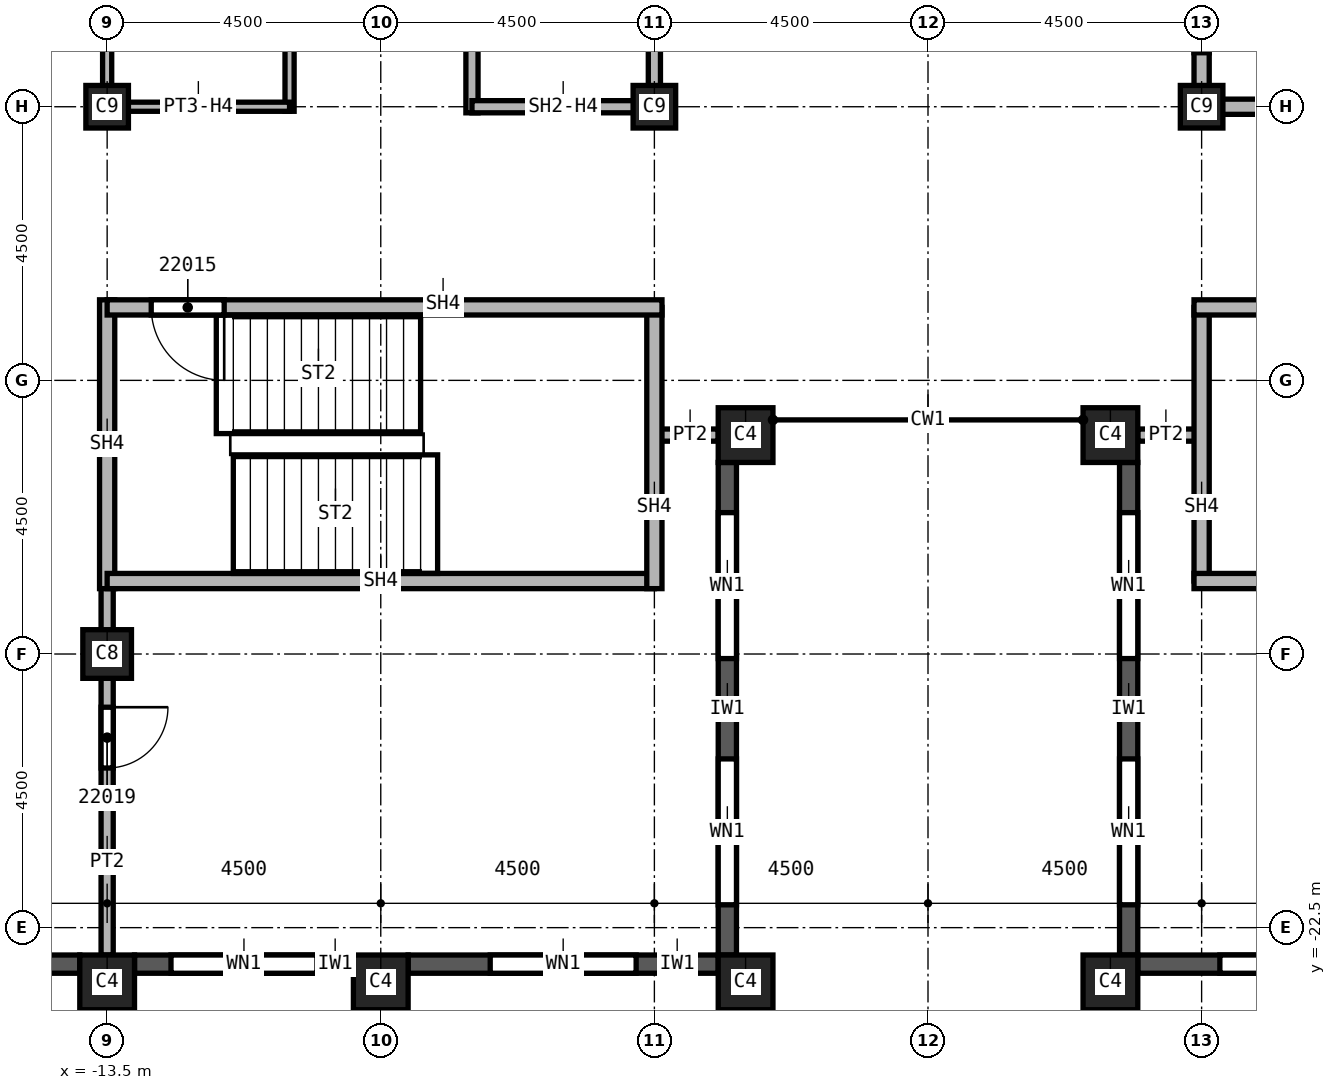
"""IFC4 building model, lengths in metres.
Left out: names, types, materials, properties, quantities, classifications, styles, units other than length and angle.
Written with IfcOpenShell. Run it as: python <this file> out.ifc"""

import sys

from ifc_helpers import new_model, si_unit, direction, frame, frame_2d, origin, origin_2d, place, context, subcontext, project, spatial, rectangle, extrude, element, fill, save


model = new_model("IFC4")
c1 = context("Model", 3, precision=1e-05, world=origin(), true_north=direction((0.0, 1.0)))
c2 = subcontext(c1, "Body", "Model", "MODEL_VIEW")
j1 = project(units=[si_unit("LENGTHUNIT", "METRE"), si_unit("PLANEANGLEUNIT", "RADIAN")], contexts=[c1])
p1 = place(None, origin())
s1 = spatial("IfcSite", under=j1, at=p1, CompositionType="ELEMENT")
p2 = place(p1, origin())
s2 = spatial("IfcBuilding", under=s1, at=p2, CompositionType="ELEMENT")
p3 = place(p2, frame((0.0, 0.0, 312.0)))
s3 = spatial("IfcBuildingStorey", under=s2, at=p3, CompositionType="ELEMENT", Elevation=312.0)
p4 = place(p3, frame((-13.5, -18.0, 0.0), z_axis=(0.0, 0.0, 1.0), x_axis=(1.0, 0.0, 0.0)))
e1 = element("IfcColumn", 1, at=p4, inside=s3, PredefinedType="COLUMN", context=c2, shape_type="SweptSolid", body=[
    extrude(rectangle(XDim=0.8, YDim=0.8, at=origin_2d()), origin(), (0.0, 0.0, 1.0), 3.74),
])
for number, where, z_axis, x_axis in (
    (2, (4.5, -9.0, 0.0), (0.0, 0.0, 1.0), (1.0, 0.0, 0.0)),
    (3, (-4.5, -9.0, 0.0), (0.0, 0.0, 1.0), (1.0, 0.0, 0.0)),
    (4, (-13.5, -9.0, 0.0), (0.0, 0.0, 1.0), (1.0, 0.0, 0.0)),
):
    element("IfcColumn", number, at=place(p3, frame(where, z_axis=z_axis, x_axis=x_axis)), inside=s3, PredefinedType="COLUMN", context=c2, shape_type="SweptSolid", body=[
        extrude(rectangle(XDim=0.7, YDim=0.7, at=origin_2d()), origin(), (0.0, 0.0, 1.0), 3.74),
    ])
for number, where, z_axis, x_axis in (
    (5, (3.0, -23.4, 0.0), (0.0, 0.0, 1.0), (1.0, 0.0, 0.0)),
    (6, (-3.0, -23.4, 0.0), (0.0, 0.0, 1.0), (1.0, 0.0, 0.0)),
    (7, (-9.0, -23.4, 0.0), (0.0, 0.0, 1.0), (1.0, 0.0, 0.0)),
    (8, (-13.5, -23.4, 0.0), (0.0, 0.0, 1.0), (1.0, 0.0, 0.0)),
    (9, (3.0, -14.4, 0.0), (0.0, 0.0, 1.0), (1.0, 0.0, 0.0)),
    (10, (-3.0, -14.4, 0.0), (0.0, 0.0, 1.0), (1.0, 0.0, 0.0)),
):
    element("IfcColumn", number, at=place(p3, frame(where, z_axis=z_axis, x_axis=x_axis)), inside=s3, PredefinedType="COLUMN", context=c2, shape_type="SweptSolid", body=[
        extrude(rectangle(XDim=0.9, YDim=0.9, at=origin_2d()), origin(), (0.0, 0.0, 1.0), 3.74),
    ])
p5 = place(p3, frame((-17.55, -23.1, 0.0), z_axis=(0.0, 0.0, 1.0), x_axis=(1.0, 0.0, 0.0)))
e11 = element("IfcWall", 11, at=p5, inside=s3, PredefinedType="SOLIDWALL", context=c2, shape_type="SweptSolid", body=[
    extrude(rectangle(XDim=3.6, YDim=0.3, at=frame_2d((1.8, 0.0))), origin(), (0.0, 0.0, 1.0), 3.14),
])
p6 = place(p5, frame((0.775, 0.0, 0.8)))
e12 = element("IfcOpeningElement", 12, at=p6, cuts=e11, PredefinedType="OPENING", context=c2, shape_type="SweptSolid", body=[
    extrude(rectangle(XDim=1.0, YDim=1.95, at=frame_2d((0.5, 0.975))), frame((0.0, 0.15, 0.0), z_axis=(0.0, -1.0, 0.0), x_axis=(1.0, 0.0, 0.0)), (0.0, 0.0, 1.0), 0.3),
])
p7 = place(p5, frame((2.375, 0.0, 0.8)))
e13 = element("IfcOpeningElement", 13, at=p7, cuts=e11, PredefinedType="OPENING", context=c2, shape_type="SweptSolid", body=[
    extrude(rectangle(XDim=0.6, YDim=1.95, at=frame_2d((0.3, 0.975))), frame((0.0, 0.15, 0.0), z_axis=(0.0, -1.0, 0.0), x_axis=(1.0, 0.0, 0.0)), (0.0, 0.0, 1.0), 0.3),
])
p8 = place(p3, frame((-13.05, -23.1, 0.0), z_axis=(0.0, 0.0, 1.0), x_axis=(1.0, 0.0, 0.0)))
e14 = element("IfcWall", 14, at=p8, inside=s3, PredefinedType="SOLIDWALL", context=c2, shape_type="SweptSolid", body=[
    extrude(rectangle(XDim=3.6, YDim=0.3, at=frame_2d((1.8, 0.0))), origin(), (0.0, 0.0, 1.0), 3.14),
])
p9 = place(p8, frame((0.6, 0.0, 0.8)))
e15 = element("IfcOpeningElement", 15, at=p9, cuts=e14, PredefinedType="OPENING", context=c2, shape_type="SweptSolid", body=[
    extrude(rectangle(XDim=2.4, YDim=1.95, at=frame_2d((1.2, 0.975))), frame((0.0, 0.15, 0.0), z_axis=(0.0, -1.0, 0.0), x_axis=(1.0, 0.0, 0.0)), (0.0, 0.0, 1.0), 0.3),
])
p10 = place(p3, frame((-8.55, -23.1, 0.0), z_axis=(0.0, 0.0, 1.0), x_axis=(1.0, 0.0, 0.0)))
e16 = element("IfcWall", 16, at=p10, inside=s3, PredefinedType="SOLIDWALL", context=c2, shape_type="SweptSolid", body=[
    extrude(rectangle(XDim=5.1, YDim=0.3, at=frame_2d((2.55, 0.0))), origin(), (0.0, 0.0, 1.0), 3.14),
])
p11 = place(p10, frame((1.35, 0.0, 0.8)))
e17 = element("IfcOpeningElement", 17, at=p11, cuts=e16, PredefinedType="OPENING", context=c2, shape_type="SweptSolid", body=[
    extrude(rectangle(XDim=2.4, YDim=1.95, at=frame_2d((1.2, 0.975))), frame((0.0, 0.15, 0.0), z_axis=(0.0, -1.0, 0.0), x_axis=(1.0, 0.0, 0.0)), (0.0, 0.0, 1.0), 0.3),
])
p12 = place(p3, frame((-3.3, -22.95, 0.0), z_axis=(0.0, 0.0, 1.0), x_axis=(0.0, 1.0, 0.0)))
e18 = element("IfcWall", 18, at=p12, inside=s3, PredefinedType="SOLIDWALL", context=c2, shape_type="SweptSolid", body=[
    extrude(rectangle(XDim=8.1, YDim=0.3, at=frame_2d((4.05, 0.0))), origin(), (0.0, 0.0, 1.0), 3.14),
])
p13 = place(p12, frame((0.825, 0.0, 0.8)))
e19 = element("IfcOpeningElement", 19, at=p13, cuts=e18, PredefinedType="OPENING", context=c2, shape_type="SweptSolid", body=[
    extrude(rectangle(XDim=2.4, YDim=1.95, at=frame_2d((1.2, 0.975))), frame((0.0, 0.15, 0.0), z_axis=(0.0, -1.0, 0.0), x_axis=(1.0, 0.0, 0.0)), (0.0, 0.0, 1.0), 0.3),
])
p14 = place(p12, frame((4.875, 0.0, 0.8)))
e20 = element("IfcOpeningElement", 20, at=p14, cuts=e18, PredefinedType="OPENING", context=c2, shape_type="SweptSolid", body=[
    extrude(rectangle(XDim=2.4, YDim=1.95, at=frame_2d((1.2, 0.975))), frame((0.0, 0.15, 0.0), z_axis=(0.0, -1.0, 0.0), x_axis=(1.0, 0.0, 0.0)), (0.0, 0.0, 1.0), 0.3),
])
p15 = place(p3, frame((3.3, -14.85, 0.0), z_axis=(0.0, 0.0, 1.0), x_axis=(0.0, -1.0, 0.0)))
e21 = element("IfcWall", 21, at=p15, inside=s3, PredefinedType="SOLIDWALL", context=c2, shape_type="SweptSolid", body=[
    extrude(rectangle(XDim=8.1, YDim=0.3, at=frame_2d((4.05, 0.0))), origin(), (0.0, 0.0, 1.0), 3.14),
])
p16 = place(p15, frame((0.825, 0.0, 0.8)))
e22 = element("IfcOpeningElement", 22, at=p16, cuts=e21, PredefinedType="OPENING", context=c2, shape_type="SweptSolid", body=[
    extrude(rectangle(XDim=2.4, YDim=1.95, at=frame_2d((1.2, 0.975))), frame((0.0, 0.15, 0.0), z_axis=(0.0, -1.0, 0.0), x_axis=(1.0, 0.0, 0.0)), (0.0, 0.0, 1.0), 0.3),
])
p17 = place(p15, frame((4.875, 0.0, 0.8)))
e23 = element("IfcOpeningElement", 23, at=p17, cuts=e21, PredefinedType="OPENING", context=c2, shape_type="SweptSolid", body=[
    extrude(rectangle(XDim=2.4, YDim=1.95, at=frame_2d((1.2, 0.975))), frame((0.0, 0.15, 0.0), z_axis=(0.0, -1.0, 0.0), x_axis=(1.0, 0.0, 0.0)), (0.0, 0.0, 1.0), 0.3),
])
p18 = place(p3, frame((3.45, -23.1, 0.0), z_axis=(0.0, 0.0, 1.0), x_axis=(1.0, 0.0, 0.0)))
e24 = element("IfcWall", 24, at=p18, inside=s3, PredefinedType="SOLIDWALL", context=c2, shape_type="SweptSolid", body=[
    extrude(rectangle(XDim=5.1, YDim=0.3, at=frame_2d((2.55, 0.0))), origin(), (0.0, 0.0, 1.0), 3.14),
])
p19 = place(p18, frame((1.35, 0.0, 0.8)))
e25 = element("IfcOpeningElement", 25, at=p19, cuts=e24, PredefinedType="OPENING", context=c2, shape_type="SweptSolid", body=[
    extrude(rectangle(XDim=2.4, YDim=1.95, at=frame_2d((1.2, 0.975))), frame((0.0, 0.15, 0.0), z_axis=(0.0, -1.0, 0.0), x_axis=(1.0, 0.0, 0.0)), (0.0, 0.0, 1.0), 0.3),
])
p20 = place(p3, frame((-13.5, -16.675, 0.0), z_axis=(0.0, 0.0, 1.0), x_axis=(0.0, -1.0, 0.0)))
e26 = element("IfcWall", 26, at=p20, inside=s3, PredefinedType="PARTITIONING", context=c2, shape_type="SweptSolid", body=[
    extrude(rectangle(XDim=6.275, YDim=0.2, at=frame_2d((3.137, 0.0))), origin(), (0.0, 0.0, 1.0), 3.74),
])
p21 = place(p20, frame((2.2, 0.0, 0.0)))
e27 = element("IfcOpeningElement", 27, at=p21, cuts=e26, PredefinedType="OPENING", context=c2, shape_type="SweptSolid", body=[
    extrude(rectangle(XDim=1.0, YDim=2.1, at=frame_2d((0.5, 1.05))), frame((0.0, 0.1, 0.0), z_axis=(0.0, -1.0, 0.0), x_axis=(1.0, 0.0, 0.0)), (0.0, 0.0, 1.0), 0.2),
])
for number, where, z_axis, x_axis in (
    (28, (-3.45, -14.4, 0.0), (0.0, 0.0, 1.0), (-1.0, 0.0, 0.0)),
    (29, (4.5, -14.4, 0.0), (0.0, 0.0, 1.0), (-1.0, 0.0, 0.0)),
):
    element("IfcWall", number, at=place(p3, frame(where, z_axis=z_axis, x_axis=x_axis)), inside=s3, PredefinedType="PARTITIONING", context=c2, shape_type="SweptSolid", body=[
        extrude(rectangle(XDim=1.05, YDim=0.2, at=frame_2d((0.525, 0.0))), origin(), (0.0, 0.0, 1.0), 3.74),
    ])
p22 = place(p3, frame((-7.5, -9.1, 0.0), z_axis=(0.0, 0.0, 1.0), x_axis=(0.0, 1.0, 0.0)))
e30 = element("IfcWall", 30, at=p22, inside=s3, PredefinedType="SOLIDWALL", context=c2, shape_type="SweptSolid", body=[
    extrude(rectangle(XDim=6.225, YDim=0.2, at=frame_2d((3.113, 0.0))), origin(), (0.0, 0.0, 1.0), 3.74),
])
p23 = place(p3, frame((-4.5, -9.0, 0.0), z_axis=(0.0, 0.0, 1.0), x_axis=(-1.0, 0.0, 0.0)))
e31 = element("IfcWall", 31, at=p23, inside=s3, PredefinedType="SOLIDWALL", context=c2, shape_type="SweptSolid", body=[
    extrude(rectangle(XDim=3.0, YDim=0.2, at=frame_2d((1.5, 0.0))), origin(), (0.0, 0.0, 1.0), 3.062),
])
p24 = place(p3, frame((-4.5, 6.0, 0.0), z_axis=(0.0, 0.0, 1.0), x_axis=(0.0, -1.0, 0.0)))
e32 = element("IfcWall", 32, at=p24, inside=s3, PredefinedType="SOLIDWALL", context=c2, shape_type="SweptSolid", body=[
    extrude(rectangle(XDim=15.1, YDim=0.2, at=frame_2d((7.55, 0.0))), origin(), (0.0, 0.0, 1.0), 3.062),
])
p25 = place(p24, frame((7.3, 0.0, 0.0)))
e33 = element("IfcOpeningElement", 33, at=p25, cuts=e32, PredefinedType="OPENING", context=c2, shape_type="SweptSolid", body=[
    extrude(rectangle(XDim=1.1, YDim=2.1, at=frame_2d((0.55, 1.05))), frame((0.0, 0.1, 0.0), z_axis=(0.0, -1.0, 0.0), x_axis=(1.0, 0.0, 0.0)), (0.0, 0.0, 1.0), 0.2),
])
p26 = place(p24, frame((4.0, 0.0, 0.0)))
e34 = element("IfcOpeningElement", 34, at=p26, cuts=e32, PredefinedType="OPENING", context=c2, shape_type="SweptSolid", body=[
    extrude(rectangle(XDim=1.1, YDim=2.1, at=frame_2d((0.55, 1.05))), frame((0.0, 0.1, 0.0), z_axis=(0.0, -1.0, 0.0), x_axis=(1.0, 0.0, 0.0)), (0.0, 0.0, 1.0), 0.2),
])
p27 = place(p3, frame((4.5, -9.125, 0.0), z_axis=(0.0, 0.0, 1.0), x_axis=(0.0, 1.0, 0.0)))
e35 = element("IfcWall", 35, at=p27, inside=s3, PredefinedType="SOLIDWALL", context=c2, shape_type="SweptSolid", body=[
    extrude(rectangle(XDim=3.125, YDim=0.25, at=frame_2d((1.562, 0.0))), origin(), (0.0, 0.0, 1.0), 3.062),
])
p28 = place(p27, frame((1.012, 0.0, 0.0)))
e36 = element("IfcOpeningElement", 36, at=p28, cuts=e35, PredefinedType="OPENING", context=c2, shape_type="SweptSolid", body=[
    extrude(rectangle(XDim=1.1, YDim=2.1, at=frame_2d((0.55, 1.05))), frame((0.0, 0.125, 0.0), z_axis=(0.0, -1.0, 0.0), x_axis=(1.0, 0.0, 0.0)), (0.0, 0.0, 1.0), 0.25),
])
p29 = place(p3, frame((7.5, -9.0, 0.0), z_axis=(0.0, 0.0, 1.0), x_axis=(-1.0, 0.0, 0.0)))
e37 = element("IfcWall", 37, at=p29, inside=s3, PredefinedType="SOLIDWALL", context=c2, shape_type="SweptSolid", body=[
    extrude(rectangle(XDim=3.0, YDim=0.25, at=frame_2d((1.5, 0.0))), origin(), (0.0, 0.0, 1.0), 3.062),
])
p30 = place(p3, frame((-13.5, -12.175, 0.0), z_axis=(0.0, 0.0, 1.0), x_axis=(0.0, -1.0, 0.0)))
e38 = element("IfcWall", 38, at=p30, inside=s3, PredefinedType="SOLIDWALL", context=c2, shape_type="SweptSolid", body=[
    extrude(rectangle(XDim=4.75, YDim=0.25, at=frame_2d((2.375, 0.0))), origin(), (0.0, 0.0, 1.0), 3.74),
])
p31 = place(p3, frame((-4.5, -16.8, 0.0), z_axis=(0.0, 0.0, 1.0), x_axis=(-1.0, 0.0, 0.0)))
e39 = element("IfcWall", 39, at=p31, inside=s3, PredefinedType="SOLIDWALL", context=c2, shape_type="SweptSolid", body=[
    extrude(rectangle(XDim=9.0, YDim=0.25, at=frame_2d((4.5, 0.0))), origin(), (0.0, 0.0, 1.0), 3.74),
])
p32 = place(p3, frame((-4.5, -12.3, 0.0), z_axis=(0.0, 0.0, 1.0), x_axis=(0.0, -1.0, 0.0)))
e40 = element("IfcWall", 40, at=p32, inside=s3, PredefinedType="SOLIDWALL", context=c2, shape_type="SweptSolid", body=[
    extrude(rectangle(XDim=4.625, YDim=0.25, at=frame_2d((2.312, 0.0))), origin(), (0.0, 0.0, 1.0), 3.74),
])
p33 = place(p3, frame((-4.375, -12.3, 0.0), z_axis=(0.0, 0.0, 1.0), x_axis=(-1.0, 0.0, 0.0)))
e41 = element("IfcWall", 41, at=p33, inside=s3, PredefinedType="SOLIDWALL", context=c2, shape_type="SweptSolid", body=[
    extrude(rectangle(XDim=9.125, YDim=0.25, at=frame_2d((4.562, 0.0))), origin(), (0.0, 0.0, 1.0), 3.74),
])
p34 = place(p33, frame((7.2, 0.0, 0.0)))
e42 = element("IfcOpeningElement", 42, at=p34, cuts=e41, PredefinedType="OPENING", context=c2, shape_type="SweptSolid", body=[
    extrude(rectangle(XDim=1.2, YDim=2.1, at=frame_2d((0.6, 1.05))), frame((0.0, 0.125, 0.0), z_axis=(0.0, -1.0, 0.0), x_axis=(1.0, 0.0, 0.0)), (0.0, 0.0, 1.0), 0.25),
])
p35 = place(p3, frame((4.5, -16.8, 0.0), z_axis=(0.0, 0.0, 1.0), x_axis=(0.0, 1.0, 0.0)))
e43 = element("IfcWall", 43, at=p35, inside=s3, PredefinedType="SOLIDWALL", context=c2, shape_type="SweptSolid", body=[
    extrude(rectangle(XDim=4.5, YDim=0.25, at=frame_2d((2.25, 0.0))), origin(), (0.0, 0.0, 1.0), 3.74),
])
p36 = place(p3, frame((13.5, -16.8, 0.0), z_axis=(0.0, 0.0, 1.0), x_axis=(-1.0, 0.0, 0.0)))
e44 = element("IfcWall", 44, at=p36, inside=s3, PredefinedType="SOLIDWALL", context=c2, shape_type="SweptSolid", body=[
    extrude(rectangle(XDim=9.125, YDim=0.25, at=frame_2d((4.562, 0.0))), origin(), (0.0, 0.0, 1.0), 3.74),
])
p37 = place(p3, frame((13.5, -12.3, 0.0), z_axis=(0.0, 0.0, 1.0), x_axis=(-1.0, 0.0, 0.0)))
e45 = element("IfcWall", 45, at=p37, inside=s3, PredefinedType="SOLIDWALL", context=c2, shape_type="SweptSolid", body=[
    extrude(rectangle(XDim=9.125, YDim=0.25, at=frame_2d((4.562, 0.0))), origin(), (0.0, 0.0, 1.0), 3.74),
])
p38 = place(p37, frame((0.6, 0.0, 0.0)))
e46 = element("IfcOpeningElement", 46, at=p38, cuts=e45, PredefinedType="OPENING", context=c2, shape_type="SweptSolid", body=[
    extrude(rectangle(XDim=1.2, YDim=2.1, at=frame_2d((0.6, 1.05))), frame((0.0, 0.125, 0.0), z_axis=(0.0, -1.0, 0.0), x_axis=(1.0, 0.0, 0.0)), (0.0, 0.0, 1.0), 0.25),
])
p39 = place(p3, frame((-13.5, -9.075, 0.0), z_axis=(0.0, 0.0, 1.0), x_axis=(0.0, 1.0, 0.0)))
e47 = element("IfcWall", 47, at=p39, inside=s3, PredefinedType="PARTITIONING", context=c2, shape_type="SweptSolid", body=[
    extrude(rectangle(XDim=4.075, YDim=0.15, at=frame_2d((2.038, 0.0))), origin(), (0.0, 0.0, 1.0), 3.062),
])
p40 = place(p3, frame((-10.5, -9.075, 0.0), z_axis=(0.0, 0.0, 1.0), x_axis=(0.0, 1.0, 0.0)))
e48 = element("IfcWall", 48, at=p40, inside=s3, PredefinedType="PARTITIONING", context=c2, shape_type="SweptSolid", body=[
    extrude(rectangle(XDim=4.15, YDim=0.15, at=frame_2d((2.075, 0.0))), origin(), (0.0, 0.0, 1.0), 3.74),
])
p41 = place(p40, frame((2.95, 0.0, 0.0)))
e49 = element("IfcOpeningElement", 49, at=p41, cuts=e48, PredefinedType="OPENING", context=c2, shape_type="SweptSolid", body=[
    extrude(rectangle(XDim=0.9, YDim=2.1, at=frame_2d((0.45, 1.05))), frame((0.0, 0.075, 0.0), z_axis=(0.0, -1.0, 0.0), x_axis=(1.0, 0.0, 0.0)), (0.0, 0.0, 1.0), 0.15),
])
p42 = place(p3, frame((-10.5, -9.0, 0.0), z_axis=(0.0, 0.0, 1.0), x_axis=(-1.0, 0.0, 0.0)))
e50 = element("IfcWall", 50, at=p42, inside=s3, PredefinedType="PARTITIONING", context=c2, shape_type="SweptSolid", body=[
    extrude(rectangle(XDim=3.0, YDim=0.15, at=frame_2d((1.5, 0.0))), origin(), (0.0, 0.0, 1.0), 3.062),
])
p43 = place(p9, origin())
e51 = element("IfcWindow", 51, at=p43, inside=s3, PartitioningType="SINGLE_PANEL", PredefinedType="WINDOW", context=c2, shape_type="SweptSolid", body=[
    extrude(rectangle(XDim=2.4, YDim=1.95, at=frame_2d((1.2, 0.975))), frame((0.0, 0.03, 0.0), z_axis=(0.0, -1.0, 0.0), x_axis=(1.0, 0.0, 0.0)), (0.0, 0.0, 1.0), 0.06),
])
fill(e15, e51)
p44 = place(p11, origin())
e52 = element("IfcWindow", 52, at=p44, inside=s3, PartitioningType="SINGLE_PANEL", PredefinedType="WINDOW", context=c2, shape_type="SweptSolid", body=[
    extrude(rectangle(XDim=2.4, YDim=1.95, at=frame_2d((1.2, 0.975))), frame((0.0, 0.03, 0.0), z_axis=(0.0, -1.0, 0.0), x_axis=(1.0, 0.0, 0.0)), (0.0, 0.0, 1.0), 0.06),
])
fill(e17, e52)
p45 = place(p13, origin())
e53 = element("IfcWindow", 53, at=p45, inside=s3, PartitioningType="SINGLE_PANEL", PredefinedType="WINDOW", context=c2, shape_type="SweptSolid", body=[
    extrude(rectangle(XDim=2.4, YDim=1.95, at=frame_2d((1.2, 0.975))), frame((0.0, 0.03, 0.0), z_axis=(0.0, -1.0, 0.0), x_axis=(1.0, 0.0, 0.0)), (0.0, 0.0, 1.0), 0.06),
])
fill(e19, e53)
p46 = place(p14, origin())
e54 = element("IfcWindow", 54, at=p46, inside=s3, PartitioningType="SINGLE_PANEL", PredefinedType="WINDOW", context=c2, shape_type="SweptSolid", body=[
    extrude(rectangle(XDim=2.4, YDim=1.95, at=frame_2d((1.2, 0.975))), frame((0.0, 0.03, 0.0), z_axis=(0.0, -1.0, 0.0), x_axis=(1.0, 0.0, 0.0)), (0.0, 0.0, 1.0), 0.06),
])
fill(e20, e54)
p47 = place(p16, origin())
e55 = element("IfcWindow", 55, at=p47, inside=s3, PartitioningType="SINGLE_PANEL", PredefinedType="WINDOW", context=c2, shape_type="SweptSolid", body=[
    extrude(rectangle(XDim=2.4, YDim=1.95, at=frame_2d((1.2, 0.975))), frame((0.0, 0.03, 0.0), z_axis=(0.0, -1.0, 0.0), x_axis=(1.0, 0.0, 0.0)), (0.0, 0.0, 1.0), 0.06),
])
fill(e22, e55)
p48 = place(p17, origin())
e56 = element("IfcWindow", 56, at=p48, inside=s3, PartitioningType="SINGLE_PANEL", PredefinedType="WINDOW", context=c2, shape_type="SweptSolid", body=[
    extrude(rectangle(XDim=2.4, YDim=1.95, at=frame_2d((1.2, 0.975))), frame((0.0, 0.03, 0.0), z_axis=(0.0, -1.0, 0.0), x_axis=(1.0, 0.0, 0.0)), (0.0, 0.0, 1.0), 0.06),
])
fill(e23, e56)
p49 = place(p19, origin())
e57 = element("IfcWindow", 57, at=p49, inside=s3, PartitioningType="SINGLE_PANEL", PredefinedType="WINDOW", context=c2, shape_type="SweptSolid", body=[
    extrude(rectangle(XDim=2.4, YDim=1.95, at=frame_2d((1.2, 0.975))), frame((0.0, 0.03, 0.0), z_axis=(0.0, -1.0, 0.0), x_axis=(1.0, 0.0, 0.0)), (0.0, 0.0, 1.0), 0.06),
])
fill(e25, e57)
p50 = place(p34, origin())
e58 = element("IfcDoor", 58, at=p50, inside=s3, OperationType="SINGLE_SWING_RIGHT", PredefinedType="DOOR", context=c2, shape_type="SweptSolid", body=[
    extrude(rectangle(XDim=1.2, YDim=2.1, at=frame_2d((0.6, 1.05))), frame((0.0, 0.025, 0.0), z_axis=(0.0, -1.0, 0.0), x_axis=(1.0, 0.0, 0.0)), (0.0, 0.0, 1.0), 0.05),
])
fill(e42, e58)
p51 = place(p21, origin())
e59 = element("IfcDoor", 59, at=p51, inside=s3, OperationType="SINGLE_SWING_RIGHT", PredefinedType="DOOR", context=c2, shape_type="SweptSolid", body=[
    extrude(rectangle(XDim=1.0, YDim=2.1, at=frame_2d((0.5, 1.05))), frame((0.0, 0.025, 0.0), z_axis=(0.0, -1.0, 0.0), x_axis=(1.0, 0.0, 0.0)), (0.0, 0.0, 1.0), 0.05),
])
fill(e27, e59)
p52 = place(p28, origin())
e60 = element("IfcDoor", 60, at=p52, inside=s3, OperationType="SLIDING_TO_LEFT", PredefinedType="DOOR", context=c2, shape_type="SweptSolid", body=[
    extrude(rectangle(XDim=1.1, YDim=2.1, at=frame_2d((0.55, 1.05))), frame((0.0, 0.025, 0.0), z_axis=(0.0, -1.0, 0.0), x_axis=(1.0, 0.0, 0.0)), (0.0, 0.0, 1.0), 0.05),
])
fill(e36, e60)
save(model, sys.argv[1])
